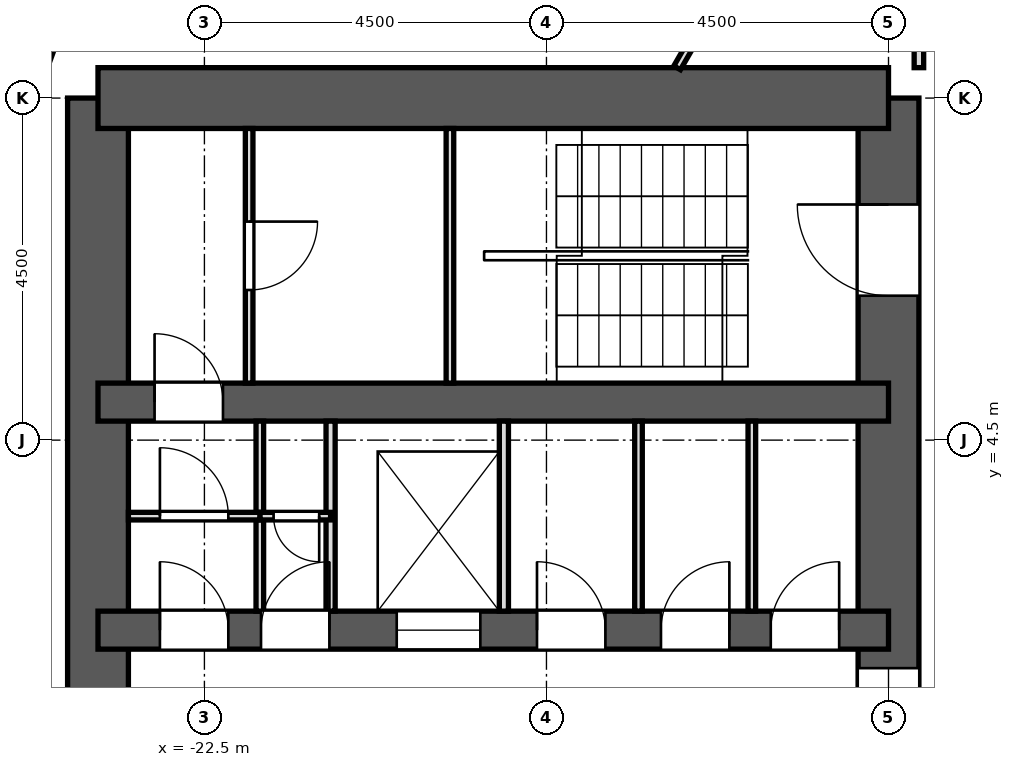
"""IFC4 building model, lengths in metres.
Left out: names, types, materials, properties, quantities, classifications, styles, units other than length and angle.
Written with IfcOpenShell. Run it as: python <this file> out.ifc"""

import sys

from ifc_helpers import new_model, si_unit, direction, frame, frame_2d, origin, place, context, subcontext, project, spatial, rectangle, extrude, element, fill, save


model = new_model("IFC4")
c1 = context("Model", 3, precision=1e-05, world=origin(), true_north=direction((0.0, 1.0)))
c2 = subcontext(c1, "Body", "Model", "MODEL_VIEW")
j1 = project(units=[si_unit("LENGTHUNIT", "METRE"), si_unit("PLANEANGLEUNIT", "RADIAN")], contexts=[c1])
p1 = place(None, origin())
s1 = spatial("IfcSite", under=j1, at=p1, CompositionType="ELEMENT")
p2 = place(p1, origin())
s2 = spatial("IfcBuilding", under=s1, at=p2, CompositionType="ELEMENT")
p3 = place(p2, frame((0.0, 0.0, 121.6)))
s3 = spatial("IfcBuildingStorey", under=s2, at=p3, CompositionType="ELEMENT", Elevation=121.6)
p4 = place(p3, frame((-13.5, -9.0, 0.0), z_axis=(0.0, 0.0, 1.0), x_axis=(0.0, 1.0, 0.0)))
e1 = element("IfcWall", 1, at=p4, inside=s3, PredefinedType="SHEAR", context=c2, shape_type="SweptSolid", body=[
    extrude(rectangle(XDim=18.0, YDim=0.8, at=frame_2d((9.0, 0.0))), origin(), (0.0, 0.0, 1.0), 3.3),
])
p5 = place(p4, frame((15.4, 0.0, 0.0)))
e2 = element("IfcOpeningElement", 2, at=p5, cuts=e1, PredefinedType="OPENING", context=c2, shape_type="SweptSolid", body=[
    extrude(rectangle(XDim=1.2, YDim=2.1, at=frame_2d((0.6, 1.05))), frame((0.0, 0.412, 0.0), z_axis=(0.0, -1.0, 0.0), x_axis=(1.0, 0.0, 0.0)), (0.0, 0.0, 1.0), 0.824),
])
p6 = place(p4, frame((1.4, 0.0, 0.0)))
e3 = element("IfcOpeningElement", 3, at=p6, cuts=e1, PredefinedType="OPENING", context=c2, shape_type="SweptSolid", body=[
    extrude(rectangle(XDim=1.2, YDim=2.1, at=frame_2d((0.6, 1.05))), frame((0.0, 0.412, 0.0), z_axis=(0.0, -1.0, 0.0), x_axis=(1.0, 0.0, 0.0)), (0.0, 0.0, 1.0), 0.824),
])
p7 = place(p4, frame((7.5, 0.0, 0.0)))
e4 = element("IfcOpeningElement", 4, at=p7, cuts=e1, PredefinedType="OPENING", context=c2, shape_type="SweptSolid", body=[
    extrude(rectangle(XDim=3.0, YDim=2.4, at=frame_2d((1.5, 1.2))), frame((0.0, 0.412, 0.0), z_axis=(0.0, -1.0, 0.0), x_axis=(1.0, 0.0, 0.0)), (0.0, 0.0, 1.0), 0.824),
])
p8 = place(p3, frame((-23.9, -9.0, 0.0), z_axis=(0.0, 0.0, 1.0), x_axis=(0.0, 1.0, 0.0)))
e5 = element("IfcWall", 5, at=p8, inside=s3, PredefinedType="SHEAR", context=c2, shape_type="SweptSolid", body=[
    extrude(rectangle(XDim=18.0, YDim=0.8, at=frame_2d((9.0, 0.0))), origin(), (0.0, 0.0, 1.0), 3.3),
])
p9 = place(p3, frame((-13.5, 9.0, 0.0), z_axis=(0.0, 0.0, 1.0), x_axis=(-1.0, 0.0, 0.0)))
e6 = element("IfcWall", 6, at=p9, inside=s3, PredefinedType="SHEAR", context=c2, shape_type="SweptSolid", body=[
    extrude(rectangle(XDim=10.4, YDim=0.8, at=frame_2d((5.2, 0.0))), origin(), (0.0, 0.0, 1.0), 3.3),
])
p10 = place(p3, frame((-13.5, 5.0, 0.0), z_axis=(0.0, 0.0, 1.0), x_axis=(-1.0, 0.0, 0.0)))
e7 = element("IfcWall", 7, at=p10, inside=s3, PredefinedType="SHEAR", context=c2, shape_type="SweptSolid", body=[
    extrude(rectangle(XDim=10.4, YDim=0.5, at=frame_2d((5.2, 0.0))), origin(), (0.0, 0.0, 1.0), 3.3),
])
p11 = place(p10, frame((8.756, 0.0, 0.0)))
e8 = element("IfcOpeningElement", 8, at=p11, cuts=e7, PredefinedType="OPENING", context=c2, shape_type="SweptSolid", body=[
    extrude(rectangle(XDim=0.9, YDim=2.1, at=frame_2d((0.45, 1.05))), frame((0.0, 0.262, 0.0), z_axis=(0.0, -1.0, 0.0), x_axis=(1.0, 0.0, 0.0)), (0.0, 0.0, 1.0), 0.524),
])
p12 = place(p3, frame((-13.5, 2.0, 0.0), z_axis=(0.0, 0.0, 1.0), x_axis=(-1.0, 0.0, 0.0)))
e9 = element("IfcWall", 9, at=p12, inside=s3, PredefinedType="SHEAR", context=c2, shape_type="SweptSolid", body=[
    extrude(rectangle(XDim=10.4, YDim=0.5, at=frame_2d((5.2, 0.0))), origin(), (0.0, 0.0, 1.0), 3.3),
])
p13 = place(p12, frame((5.37, 0.0, 0.0)))
e10 = element("IfcOpeningElement", 10, at=p13, cuts=e9, PredefinedType="OPENING", context=c2, shape_type="SweptSolid", body=[
    extrude(rectangle(XDim=1.1, YDim=2.1, at=frame_2d((0.55, 1.05))), frame((0.0, 0.262, 0.0), z_axis=(0.0, -1.0, 0.0), x_axis=(1.0, 0.0, 0.0)), (0.0, 0.0, 1.0), 0.524),
])
p14 = place(p12, frame((0.649, 0.0, 0.0)))
e11 = element("IfcOpeningElement", 11, at=p14, cuts=e9, PredefinedType="OPENING", context=c2, shape_type="SweptSolid", body=[
    extrude(rectangle(XDim=0.9, YDim=2.1, at=frame_2d((0.45, 1.05))), frame((0.0, 0.262, 0.0), z_axis=(0.0, -1.0, 0.0), x_axis=(1.0, 0.0, 0.0)), (0.0, 0.0, 1.0), 0.524),
])
p15 = place(p12, frame((2.094, 0.0, 0.0)))
e12 = element("IfcOpeningElement", 12, at=p15, cuts=e9, PredefinedType="OPENING", context=c2, shape_type="SweptSolid", body=[
    extrude(rectangle(XDim=0.9, YDim=2.1, at=frame_2d((0.45, 1.05))), frame((0.0, 0.262, 0.0), z_axis=(0.0, -1.0, 0.0), x_axis=(1.0, 0.0, 0.0)), (0.0, 0.0, 1.0), 0.524),
])
p16 = place(p12, frame((3.725, 0.0, 0.0)))
e13 = element("IfcOpeningElement", 13, at=p16, cuts=e9, PredefinedType="OPENING", context=c2, shape_type="SweptSolid", body=[
    extrude(rectangle(XDim=0.9, YDim=2.1, at=frame_2d((0.45, 1.05))), frame((0.0, 0.262, 0.0), z_axis=(0.0, -1.0, 0.0), x_axis=(1.0, 0.0, 0.0)), (0.0, 0.0, 1.0), 0.524),
])
p17 = place(p12, frame((7.355, 0.0, 0.0)))
e14 = element("IfcOpeningElement", 14, at=p17, cuts=e9, PredefinedType="OPENING", context=c2, shape_type="SweptSolid", body=[
    extrude(rectangle(XDim=0.9, YDim=2.1, at=frame_2d((0.45, 1.05))), frame((0.0, 0.262, 0.0), z_axis=(0.0, -1.0, 0.0), x_axis=(1.0, 0.0, 0.0)), (0.0, 0.0, 1.0), 0.524),
])
p18 = place(p12, frame((8.686, 0.0, 0.0)))
e15 = element("IfcOpeningElement", 15, at=p18, cuts=e9, PredefinedType="OPENING", context=c2, shape_type="SweptSolid", body=[
    extrude(rectangle(XDim=0.9, YDim=2.1, at=frame_2d((0.45, 1.05))), frame((0.0, 0.262, 0.0), z_axis=(0.0, -1.0, 0.0), x_axis=(1.0, 0.0, 0.0)), (0.0, 0.0, 1.0), 0.524),
])
p19 = place(p3, frame((-24.369, 10.811, 0.0), z_axis=(0.0, 0.0, 1.0), x_axis=(-0.341990236633, -0.939703505393, 0.0)))
e16 = element("IfcWall", 16, at=p19, inside=s3, PredefinedType="SOLIDWALL", context=c2, shape_type="SweptSolid", body=[
    extrude(rectangle(XDim=3.648, YDim=0.6, at=frame_2d((1.824, 0.0))), origin(), (0.0, 0.0, 1.0), 2.8),
])
p20 = place(p3, frame((-13.086, 13.086, 0.0), z_axis=(0.0, 0.0, 1.0), x_axis=(0.707208486583, -0.707005061159, 0.0)))
e17 = element("IfcWall", 17, at=p20, inside=s3, PredefinedType="PARTITIONING", context=c2, shape_type="SweptSolid", body=[
    extrude(rectangle(XDim=7.201, YDim=0.125, at=frame_2d((3.601, 0.0))), origin(), (0.0, 0.0, 1.0), 2.8),
])
p21 = place(p20, frame((3.126, 0.0, 0.0)))
e18 = element("IfcOpeningElement", 18, at=p21, cuts=e17, PredefinedType="OPENING", context=c2, shape_type="SweptSolid", body=[
    extrude(rectangle(XDim=1.0, YDim=2.1, at=frame_2d((0.5, 1.05))), frame((0.0, 0.074, 0.0), z_axis=(0.0, -1.0, 0.0), x_axis=(1.0, 0.0, 0.0)), (0.0, 0.0, 1.0), 0.149),
])
p22 = place(p3, frame((-16.281, 9.398, 0.0), z_axis=(0.0, 0.0, 1.0), x_axis=(0.499872473806, 0.866099018549, 0.0)))
e19 = element("IfcWall", 19, at=p22, inside=s3, PredefinedType="PARTITIONING", context=c2, shape_type="SweptSolid", body=[
    extrude(rectangle(XDim=1.597, YDim=0.1, at=frame_2d((0.798, 0.0))), origin(), (0.0, 0.0, 1.0), 2.8),
])
p23 = place(p3, frame((-13.1, 9.4, 0.0), z_axis=(0.0, 0.0, 1.0), x_axis=(0.0, 1.0, 0.0)))
e20 = element("IfcWall", 20, at=p23, inside=s3, PredefinedType="PARTITIONING", context=c2, shape_type="SweptSolid", body=[
    extrude(rectangle(XDim=3.638, YDim=0.125, at=frame_2d((1.819, 0.0))), origin(), (0.0, 0.0, 1.0), 2.8),
])
for number, where, z_axis, x_axis in (
    (21, (-15.298, 2.25, 0.0), (0.0, 0.0, 1.0), (0.0, 1.0, 0.0)),
    (22, (-16.789, 2.25, 0.0), (0.0, 0.0, 1.0), (0.0, 1.0, 0.0)),
):
    element("IfcWall", number, at=place(p3, frame(where, z_axis=z_axis, x_axis=x_axis)), inside=s3, PredefinedType="PARTITIONING", context=c2, shape_type="SweptSolid", body=[
        extrude(rectangle(XDim=2.5, YDim=0.1, at=frame_2d((1.25, 0.0))), origin(), (0.0, 0.0, 1.0), 2.8),
    ])
for number, where, z_axis, x_axis in (
    (23, (-18.56, 2.25, 0.0), (0.0, 0.0, 1.0), (0.0, 1.0, 0.0)),
    (24, (-20.84, 2.25, 0.0), (0.0, 0.0, 1.0), (0.0, 1.0, 0.0)),
):
    element("IfcWall", number, at=place(p3, frame(where, z_axis=z_axis, x_axis=x_axis)), inside=s3, PredefinedType="PARTITIONING", context=c2, shape_type="SweptSolid", body=[
        extrude(rectangle(XDim=2.5, YDim=0.12, at=frame_2d((1.25, 0.0))), origin(), (0.0, 0.0, 1.0), 2.8),
    ])
p24 = place(p3, frame((-21.771, 2.25, 0.0), z_axis=(0.0, 0.0, 1.0), x_axis=(0.0, 1.0, 0.0)))
e25 = element("IfcWall", 25, at=p24, inside=s3, PredefinedType="PARTITIONING", context=c2, shape_type="SweptSolid", body=[
    extrude(rectangle(XDim=2.5, YDim=0.1, at=frame_2d((1.25, 0.0))), origin(), (0.0, 0.0, 1.0), 2.8),
])
p25 = place(p3, frame((-20.84, 3.5, 0.0), z_axis=(0.0, 0.0, 1.0), x_axis=(-1.0, 0.0, 0.0)))
e26 = element("IfcWall", 26, at=p25, inside=s3, PredefinedType="PARTITIONING", context=c2, shape_type="SweptSolid", body=[
    extrude(rectangle(XDim=0.931, YDim=0.1, at=frame_2d((0.465, 0.0))), origin(), (0.0, 0.0, 1.0), 2.8),
])
p26 = place(p25, frame((0.15, 0.0, 0.0)))
e27 = element("IfcOpeningElement", 27, at=p26, cuts=e26, PredefinedType="OPENING", context=c2, shape_type="SweptSolid", body=[
    extrude(rectangle(XDim=0.6, YDim=2.1, at=frame_2d((0.3, 1.05))), frame((0.0, 0.062, 0.0), z_axis=(0.0, -1.0, 0.0), x_axis=(1.0, 0.0, 0.0)), (0.0, 0.0, 1.0), 0.124),
])
p27 = place(p3, frame((-21.771, 3.5, 0.0), z_axis=(0.0, 0.0, 1.0), x_axis=(-1.0, 0.0, 0.0)))
e28 = element("IfcWall", 28, at=p27, inside=s3, PredefinedType="PARTITIONING", context=c2, shape_type="SweptSolid", body=[
    extrude(rectangle(XDim=1.729, YDim=0.1, at=frame_2d((0.865, 0.0))), origin(), (0.0, 0.0, 1.0), 2.8),
])
p28 = place(p27, frame((0.415, 0.0, 0.0)))
e29 = element("IfcOpeningElement", 29, at=p28, cuts=e28, PredefinedType="OPENING", context=c2, shape_type="SweptSolid", body=[
    extrude(rectangle(XDim=0.9, YDim=2.1, at=frame_2d((0.45, 1.05))), frame((0.0, 0.062, 0.0), z_axis=(0.0, -1.0, 0.0), x_axis=(1.0, 0.0, 0.0)), (0.0, 0.0, 1.0), 0.124),
])
p29 = place(p3, frame((-19.27, 5.25, 0.0), z_axis=(0.0, 0.0, 1.0), x_axis=(0.0, 1.0, 0.0)))
e30 = element("IfcWall", 30, at=p29, inside=s3, PredefinedType="PARTITIONING", context=c2, shape_type="SweptSolid", body=[
    extrude(rectangle(XDim=3.35, YDim=0.1, at=frame_2d((1.675, 0.0))), origin(), (0.0, 0.0, 1.0), 2.8),
])
p30 = place(p3, frame((-21.912, 5.25, 0.0), z_axis=(0.0, 0.0, 1.0), x_axis=(0.0, 1.0, 0.0)))
e31 = element("IfcWall", 31, at=p30, inside=s3, PredefinedType="PARTITIONING", context=c2, shape_type="SweptSolid", body=[
    extrude(rectangle(XDim=3.35, YDim=0.1, at=frame_2d((1.675, 0.0))), origin(), (0.0, 0.0, 1.0), 2.8),
])
p31 = place(p30, frame((1.225, 0.0, 0.0)))
e32 = element("IfcOpeningElement", 32, at=p31, cuts=e31, PredefinedType="OPENING", context=c2, shape_type="SweptSolid", body=[
    extrude(rectangle(XDim=0.9, YDim=2.1, at=frame_2d((0.45, 1.05))), frame((0.0, 0.062, 0.0), z_axis=(0.0, -1.0, 0.0), x_axis=(1.0, 0.0, 0.0)), (0.0, 0.0, 1.0), 0.124),
])
p32 = place(p13, origin())
e33 = element("IfcDoor", 33, at=p32, inside=s3, OperationType="DOUBLE_DOOR_SLIDING", PredefinedType="DOOR", context=c2, shape_type="SweptSolid", body=[
    extrude(rectangle(XDim=1.1, YDim=2.1, at=frame_2d((0.55, 1.05))), frame((0.0, 0.025, 0.0), z_axis=(0.0, -1.0, 0.0), x_axis=(1.0, 0.0, 0.0)), (0.0, 0.0, 1.0), 0.05),
])
fill(e10, e33)
p33 = place(p14, frame((0.9, 0.0, 0.0), z_axis=(0.0, 0.0, 1.0), x_axis=(-1.0, 0.0, 0.0)))
e34 = element("IfcDoor", 34, at=p33, inside=s3, OperationType="SINGLE_SWING_RIGHT", PredefinedType="DOOR", context=c2, shape_type="SweptSolid", body=[
    extrude(rectangle(XDim=0.9, YDim=2.1, at=frame_2d((0.45, 1.05))), frame((0.0, 0.025, 0.0), z_axis=(0.0, -1.0, 0.0), x_axis=(1.0, 0.0, 0.0)), (0.0, 0.0, 1.0), 0.05),
])
fill(e11, e34)
p34 = place(p15, frame((0.9, 0.0, 0.0), z_axis=(0.0, 0.0, 1.0), x_axis=(-1.0, 0.0, 0.0)))
e35 = element("IfcDoor", 35, at=p34, inside=s3, OperationType="SINGLE_SWING_RIGHT", PredefinedType="DOOR", context=c2, shape_type="SweptSolid", body=[
    extrude(rectangle(XDim=0.9, YDim=2.1, at=frame_2d((0.45, 1.05))), frame((0.0, 0.025, 0.0), z_axis=(0.0, -1.0, 0.0), x_axis=(1.0, 0.0, 0.0)), (0.0, 0.0, 1.0), 0.05),
])
fill(e12, e35)
p35 = place(p16, frame((0.9, 0.0, 0.0), z_axis=(0.0, 0.0, 1.0), x_axis=(-1.0, 0.0, 0.0)))
e36 = element("IfcDoor", 36, at=p35, inside=s3, OperationType="SINGLE_SWING_LEFT", PredefinedType="DOOR", context=c2, shape_type="SweptSolid", body=[
    extrude(rectangle(XDim=0.9, YDim=2.1, at=frame_2d((0.45, 1.05))), frame((0.0, 0.025, 0.0), z_axis=(0.0, -1.0, 0.0), x_axis=(1.0, 0.0, 0.0)), (0.0, 0.0, 1.0), 0.05),
])
fill(e13, e36)
p36 = place(p17, frame((0.9, 0.0, 0.0), z_axis=(0.0, 0.0, 1.0), x_axis=(-1.0, 0.0, 0.0)))
e37 = element("IfcDoor", 37, at=p36, inside=s3, OperationType="SINGLE_SWING_RIGHT", PredefinedType="DOOR", context=c2, shape_type="SweptSolid", body=[
    extrude(rectangle(XDim=0.9, YDim=2.1, at=frame_2d((0.45, 1.05))), frame((0.0, 0.025, 0.0), z_axis=(0.0, -1.0, 0.0), x_axis=(1.0, 0.0, 0.0)), (0.0, 0.0, 1.0), 0.05),
])
fill(e14, e37)
p37 = place(p18, frame((0.9, 0.0, 0.0), z_axis=(0.0, 0.0, 1.0), x_axis=(-1.0, 0.0, 0.0)))
e38 = element("IfcDoor", 38, at=p37, inside=s3, OperationType="SINGLE_SWING_LEFT", PredefinedType="DOOR", context=c2, shape_type="SweptSolid", body=[
    extrude(rectangle(XDim=0.9, YDim=2.1, at=frame_2d((0.45, 1.05))), frame((0.0, 0.025, 0.0), z_axis=(0.0, -1.0, 0.0), x_axis=(1.0, 0.0, 0.0)), (0.0, 0.0, 1.0), 0.05),
])
fill(e15, e38)
p38 = place(p26, origin())
e39 = element("IfcDoor", 39, at=p38, inside=s3, OperationType="SINGLE_SWING_LEFT", PredefinedType="DOOR", context=c2, shape_type="SweptSolid", body=[
    extrude(rectangle(XDim=0.6, YDim=2.1, at=frame_2d((0.3, 1.05))), frame((0.0, 0.025, 0.0), z_axis=(0.0, -1.0, 0.0), x_axis=(1.0, 0.0, 0.0)), (0.0, 0.0, 1.0), 0.05),
])
fill(e27, e39)
p39 = place(p28, frame((0.9, 0.0, 0.0), z_axis=(0.0, 0.0, 1.0), x_axis=(-1.0, 0.0, 0.0)))
e40 = element("IfcDoor", 40, at=p39, inside=s3, OperationType="SINGLE_SWING_LEFT", PredefinedType="DOOR", context=c2, shape_type="SweptSolid", body=[
    extrude(rectangle(XDim=0.9, YDim=2.1, at=frame_2d((0.45, 1.05))), frame((0.0, 0.025, 0.0), z_axis=(0.0, -1.0, 0.0), x_axis=(1.0, 0.0, 0.0)), (0.0, 0.0, 1.0), 0.05),
])
fill(e29, e40)
p40 = place(p31, frame((0.9, 0.0, 0.0), z_axis=(0.0, 0.0, 1.0), x_axis=(-1.0, 0.0, 0.0)))
e41 = element("IfcDoor", 41, at=p40, inside=s3, OperationType="SINGLE_SWING_LEFT", PredefinedType="DOOR", context=c2, shape_type="SweptSolid", body=[
    extrude(rectangle(XDim=0.9, YDim=2.1, at=frame_2d((0.45, 1.05))), frame((0.0, 0.025, 0.0), z_axis=(0.0, -1.0, 0.0), x_axis=(1.0, 0.0, 0.0)), (0.0, 0.0, 1.0), 0.05),
])
fill(e32, e41)
p41 = place(p11, frame((0.9, 0.0, 0.0), z_axis=(0.0, 0.0, 1.0), x_axis=(-1.0, 0.0, 0.0)))
e42 = element("IfcDoor", 42, at=p41, inside=s3, OperationType="SINGLE_SWING_LEFT", PredefinedType="DOOR", context=c2, shape_type="SweptSolid", body=[
    extrude(rectangle(XDim=0.9, YDim=2.1, at=frame_2d((0.45, 1.05))), frame((0.0, 0.025, 0.0), z_axis=(0.0, -1.0, 0.0), x_axis=(1.0, 0.0, 0.0)), (0.0, 0.0, 1.0), 0.05),
])
fill(e8, e42)
p42 = place(p5, origin())
e43 = element("IfcDoor", 43, at=p42, inside=s3, OperationType="SINGLE_SWING_RIGHT", PredefinedType="DOOR", context=c2, shape_type="SweptSolid", body=[
    extrude(rectangle(XDim=1.2, YDim=2.1, at=frame_2d((0.6, 1.05))), frame((0.0, 0.025, 0.0), z_axis=(0.0, -1.0, 0.0), x_axis=(1.0, 0.0, 0.0)), (0.0, 0.0, 1.0), 0.05),
])
fill(e2, e43)
p43 = place(p7, origin())
e44 = element("IfcDoor", 44, at=p43, inside=s3, OperationType="DOUBLE_DOOR_SLIDING", PredefinedType="DOOR", context=c2, shape_type="SweptSolid", body=[
    extrude(rectangle(XDim=3.0, YDim=2.4, at=frame_2d((1.5, 1.2))), frame((0.0, 0.025, 0.0), z_axis=(0.0, -1.0, 0.0), x_axis=(1.0, 0.0, 0.0)), (0.0, 0.0, 1.0), 0.05),
])
fill(e4, e44)
save(model, sys.argv[1])
